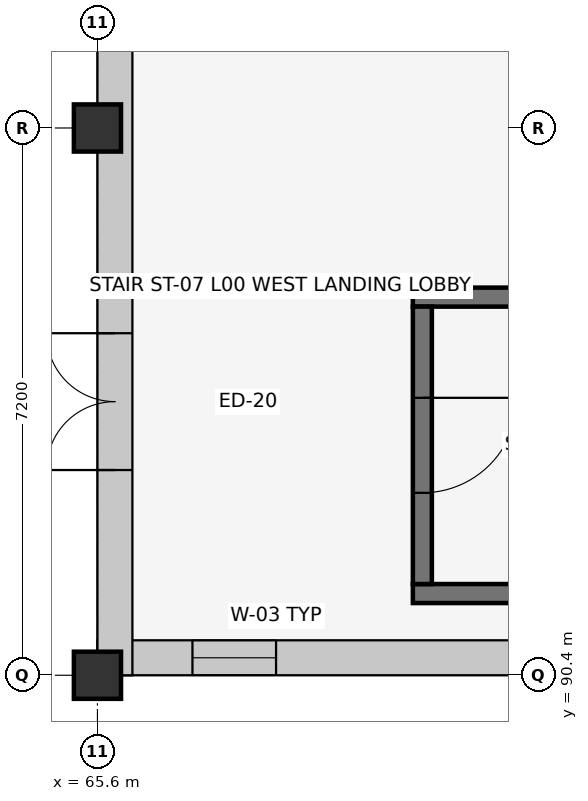
"""IFC4 building model, lengths in metres.
Left out: names, types, materials, properties, quantities, classifications, styles, units other than length and angle.
Written with IfcOpenShell. Run it as: python <this file> out.ifc"""

import sys

from ifc_helpers import new_model, si_unit, direction, frame, frame_2d, origin, origin_2d, place, context, subcontext, project, spatial, rectangle, extrude, element, fill, save


model = new_model("IFC4")
c1 = context("Model", 3, precision=1e-05, world=origin(), true_north=direction((0.0, 1.0)))
c2 = subcontext(c1, "Body", "Model", "MODEL_VIEW")
j1 = project(units=[si_unit("LENGTHUNIT", "METRE"), si_unit("PLANEANGLEUNIT", "RADIAN")], contexts=[c1])
p1 = place(None, origin())
s1 = spatial("IfcSite", under=j1, at=p1, CompositionType="ELEMENT")
p2 = place(p1, origin())
s2 = spatial("IfcBuilding", under=s1, at=p2, CompositionType="ELEMENT")
p3 = place(p2, origin())
s3 = spatial("IfcBuildingStorey", under=s2, at=p3, CompositionType="ELEMENT", Elevation=0.0)
for number, where, z_axis, x_axis in (
    (1, (65.6, 90.4, 0.0), (0.0, 0.0, 1.0), (1.0, 0.0, 0.0)),
    (2, (65.6, 97.6, 0.0), (0.0, 0.0, 1.0), (1.0, 0.0, 0.0)),
):
    element("IfcColumn", number, at=place(p3, frame(where, z_axis=z_axis, x_axis=x_axis)), inside=s3, PredefinedType="COLUMN", context=c2, shape_type="SweptSolid", body=[
        extrude(rectangle(XDim=0.62, YDim=0.62, at=origin_2d()), origin(), (0.0, 0.0, 1.0), 5.4),
    ])
p4 = place(p3, frame((108.8, 90.63, 0.0), z_axis=(0.0, 0.0, 1.0), x_axis=(-1.0, 0.0, 0.0)))
e3 = element("IfcWall", 3, at=p4, inside=s3, PredefinedType="SOLIDWALL", context=c2, shape_type="SweptSolid", body=[
    extrude(rectangle(XDim=43.2, YDim=0.46, at=frame_2d((21.6, 0.0))), origin(), (0.0, 0.0, 1.0), 4.415),
])
p5 = place(p4, frame((9.6, 0.0, 0.0)))
e4 = element("IfcOpeningElement", 4, at=p5, cuts=e3, PredefinedType="OPENING", context=c2, shape_type="SweptSolid", body=[
    extrude(rectangle(XDim=2.4, YDim=2.4, at=frame_2d((1.2, 1.2))), frame((0.0, 0.242, 0.0), z_axis=(0.0, -1.0, 0.0), x_axis=(1.0, 0.0, 0.0)), (0.0, 0.0, 1.0), 0.484),
])
p6 = place(p4, frame((1.175, 0.0, 0.9)))
e5 = element("IfcOpeningElement", 5, at=p6, cuts=e3, PredefinedType="OPENING", context=c2, shape_type="SweptSolid", body=[
    extrude(rectangle(XDim=1.25, YDim=1.6, at=frame_2d((0.625, 0.8))), frame((0.0, 0.242, 0.0), z_axis=(0.0, -1.0, 0.0), x_axis=(1.0, 0.0, 0.0)), (0.0, 0.0, 1.0), 0.484),
])
p7 = place(p4, frame((4.71, 0.0, 0.9)))
e6 = element("IfcOpeningElement", 6, at=p7, cuts=e3, PredefinedType="OPENING", context=c2, shape_type="SweptSolid", body=[
    extrude(rectangle(XDim=1.38, YDim=1.6, at=frame_2d((0.69, 0.8))), frame((0.0, 0.242, 0.0), z_axis=(0.0, -1.0, 0.0), x_axis=(1.0, 0.0, 0.0)), (0.0, 0.0, 1.0), 0.484),
])
p8 = place(p4, frame((15.64, 0.0, 0.9)))
e7 = element("IfcOpeningElement", 7, at=p8, cuts=e3, PredefinedType="OPENING", context=c2, shape_type="SweptSolid", body=[
    extrude(rectangle(XDim=1.12, YDim=1.75, at=frame_2d((0.56, 0.875))), frame((0.0, 0.242, 0.0), z_axis=(0.0, -1.0, 0.0), x_axis=(1.0, 0.0, 0.0)), (0.0, 0.0, 1.0), 0.484),
])
p9 = place(p4, frame((19.18, 0.0, 0.9)))
e8 = element("IfcOpeningElement", 8, at=p9, cuts=e3, PredefinedType="OPENING", context=c2, shape_type="SweptSolid", body=[
    extrude(rectangle(XDim=1.24, YDim=1.75, at=frame_2d((0.62, 0.875))), frame((0.0, 0.242, 0.0), z_axis=(0.0, -1.0, 0.0), x_axis=(1.0, 0.0, 0.0)), (0.0, 0.0, 1.0), 0.484),
])
p10 = place(p4, frame((26.28, 0.0, 0.9)))
e9 = element("IfcOpeningElement", 9, at=p10, cuts=e3, PredefinedType="OPENING", context=c2, shape_type="SweptSolid", body=[
    extrude(rectangle(XDim=1.44, YDim=1.75, at=frame_2d((0.72, 0.875))), frame((0.0, 0.242, 0.0), z_axis=(0.0, -1.0, 0.0), x_axis=(1.0, 0.0, 0.0)), (0.0, 0.0, 1.0), 0.484),
])
p11 = place(p4, frame((29.85, 0.0, 0.9)))
e10 = element("IfcOpeningElement", 10, at=p11, cuts=e3, PredefinedType="OPENING", context=c2, shape_type="SweptSolid", body=[
    extrude(rectangle(XDim=1.5, YDim=1.75, at=frame_2d((0.75, 0.875))), frame((0.0, 0.242, 0.0), z_axis=(0.0, -1.0, 0.0), x_axis=(1.0, 0.0, 0.0)), (0.0, 0.0, 1.0), 0.484),
])
p12 = place(p4, frame((33.75, 0.0, 0.9)))
e11 = element("IfcOpeningElement", 11, at=p12, cuts=e3, PredefinedType="OPENING", context=c2, shape_type="SweptSolid", body=[
    extrude(rectangle(XDim=0.9, YDim=1.35, at=frame_2d((0.45, 0.675))), frame((0.0, 0.242, 0.0), z_axis=(0.0, -1.0, 0.0), x_axis=(1.0, 0.0, 0.0)), (0.0, 0.0, 1.0), 0.484),
])
p13 = place(p4, frame((40.85, 0.0, 0.9)))
e12 = element("IfcOpeningElement", 12, at=p13, cuts=e3, PredefinedType="OPENING", context=c2, shape_type="SweptSolid", body=[
    extrude(rectangle(XDim=1.1, YDim=1.35, at=frame_2d((0.55, 0.675))), frame((0.0, 0.242, 0.0), z_axis=(0.0, -1.0, 0.0), x_axis=(1.0, 0.0, 0.0)), (0.0, 0.0, 1.0), 0.484),
])
p14 = place(p3, frame((65.83, 90.4, 0.0), z_axis=(0.0, 0.0, 1.0), x_axis=(0.0, 1.0, 0.0)))
e13 = element("IfcWall", 13, at=p14, inside=s3, PredefinedType="SOLIDWALL", context=c2, shape_type="SweptSolid", body=[
    extrude(rectangle(XDim=35.6, YDim=0.46, at=frame_2d((17.8, 0.0))), origin(), (0.0, 0.0, 1.0), 4.515),
])
p15 = place(p14, frame((2.7, 0.0, 0.0)))
e14 = element("IfcOpeningElement", 14, at=p15, cuts=e13, PredefinedType="OPENING", context=c2, shape_type="SweptSolid", body=[
    extrude(rectangle(XDim=1.8, YDim=2.3, at=frame_2d((0.9, 1.15))), frame((0.0, 0.242, 0.0), z_axis=(0.0, -1.0, 0.0), x_axis=(1.0, 0.0, 0.0)), (0.0, 0.0, 1.0), 0.484),
])
p16 = place(p14, frame((17.15, 0.0, 0.9)))
e15 = element("IfcOpeningElement", 15, at=p16, cuts=e13, PredefinedType="OPENING", context=c2, shape_type="SweptSolid", body=[
    extrude(rectangle(XDim=1.3, YDim=1.35, at=frame_2d((0.65, 0.675))), frame((0.0, 0.242, 0.0), z_axis=(0.0, -1.0, 0.0), x_axis=(1.0, 0.0, 0.0)), (0.0, 0.0, 1.0), 0.484),
])
p17 = place(p14, frame((25.236, 0.0, 0.9)))
e16 = element("IfcOpeningElement", 16, at=p17, cuts=e13, PredefinedType="OPENING", context=c2, shape_type="SweptSolid", body=[
    extrude(rectangle(XDim=0.95, YDim=1.45, at=frame_2d((0.475, 0.725))), frame((0.0, 0.242, 0.0), z_axis=(0.0, -1.0, 0.0), x_axis=(1.0, 0.0, 0.0)), (0.0, 0.0, 1.0), 0.484),
])
p18 = place(p14, frame((33.047, 0.0, 0.9)))
e17 = element("IfcOpeningElement", 17, at=p18, cuts=e13, PredefinedType="OPENING", context=c2, shape_type="SweptSolid", body=[
    extrude(rectangle(XDim=1.15, YDim=1.45, at=frame_2d((0.575, 0.725))), frame((0.0, 0.242, 0.0), z_axis=(0.0, -1.0, 0.0), x_axis=(1.0, 0.0, 0.0)), (0.0, 0.0, 1.0), 0.484),
])
p19 = place(p3, frame((69.75, 91.475, 0.0), z_axis=(0.0, 0.0, 1.0), x_axis=(1.0, 0.0, 0.0)))
e18 = element("IfcWall", 18, at=p19, inside=s3, PredefinedType="SHEAR", context=c2, shape_type="SweptSolid", body=[
    extrude(rectangle(XDim=9.57, YDim=0.25, at=frame_2d((4.785, 0.0))), origin(), (0.0, 0.0, 1.0), 5.12),
])
p20 = place(p3, frame((78.75, 95.375, 0.0), z_axis=(0.0, 0.0, 1.0), x_axis=(-1.0, 0.0, 0.0)))
e19 = element("IfcWall", 19, at=p20, inside=s3, PredefinedType="SHEAR", context=c2, shape_type="SweptSolid", body=[
    extrude(rectangle(XDim=9.0, YDim=0.25, at=frame_2d((4.5, 0.0))), origin(), (0.0, 0.0, 1.0), 5.12),
])
p21 = place(p3, frame((69.875, 95.25, 0.0), z_axis=(0.0, 0.0, 1.0), x_axis=(0.0, -1.0, 0.0)))
e20 = element("IfcWall", 20, at=p21, inside=s3, PredefinedType="SHEAR", context=c2, shape_type="SweptSolid", body=[
    extrude(rectangle(XDim=3.65, YDim=0.25, at=frame_2d((1.825, 0.0))), origin(), (0.0, 0.0, 1.0), 5.12),
])
p22 = place(p21, frame((1.2, 0.0, 0.0)))
e21 = element("IfcOpeningElement", 21, at=p22, cuts=e20, PredefinedType="OPENING", context=c2, shape_type="SweptSolid", body=[
    extrude(rectangle(XDim=1.25, YDim=2.15, at=frame_2d((0.625, 1.075))), frame((0.0, 0.137, 0.0), z_axis=(0.0, -1.0, 0.0), x_axis=(1.0, 0.0, 0.0)), (0.0, 0.0, 1.0), 0.274),
])
p23 = place(p13, origin())
e22 = element("IfcWindow", 22, at=p23, inside=s3, PartitioningType="SINGLE_PANEL", PredefinedType="WINDOW", context=c2, shape_type="SweptSolid", body=[
    extrude(rectangle(XDim=1.1, YDim=1.35, at=frame_2d((0.55, 0.675))), frame((0.0, 0.03, 0.0), z_axis=(0.0, -1.0, 0.0), x_axis=(1.0, 0.0, 0.0)), (0.0, 0.0, 1.0), 0.06),
])
fill(e12, e22)
p24 = place(p15, origin())
e23 = element("IfcDoor", 23, at=p24, inside=s3, OperationType="DOUBLE_DOOR_SINGLE_SWING", PredefinedType="DOOR", context=c2, shape_type="SweptSolid", body=[
    extrude(rectangle(XDim=1.8, YDim=2.3, at=frame_2d((0.9, 1.15))), frame((0.0, 0.025, 0.0), z_axis=(0.0, -1.0, 0.0), x_axis=(1.0, 0.0, 0.0)), (0.0, 0.0, 1.0), 0.05),
])
fill(e14, e23)
p25 = place(p22, origin())
e24 = element("IfcDoor", 24, at=p25, inside=s3, OperationType="SINGLE_SWING_LEFT", PredefinedType="DOOR", context=c2, shape_type="SweptSolid", body=[
    extrude(rectangle(XDim=1.25, YDim=2.15, at=frame_2d((0.625, 1.075))), frame((0.0, 0.025, 0.0), z_axis=(0.0, -1.0, 0.0), x_axis=(1.0, 0.0, 0.0)), (0.0, 0.0, 1.0), 0.05),
])
fill(e21, e24)
save(model, sys.argv[1])
